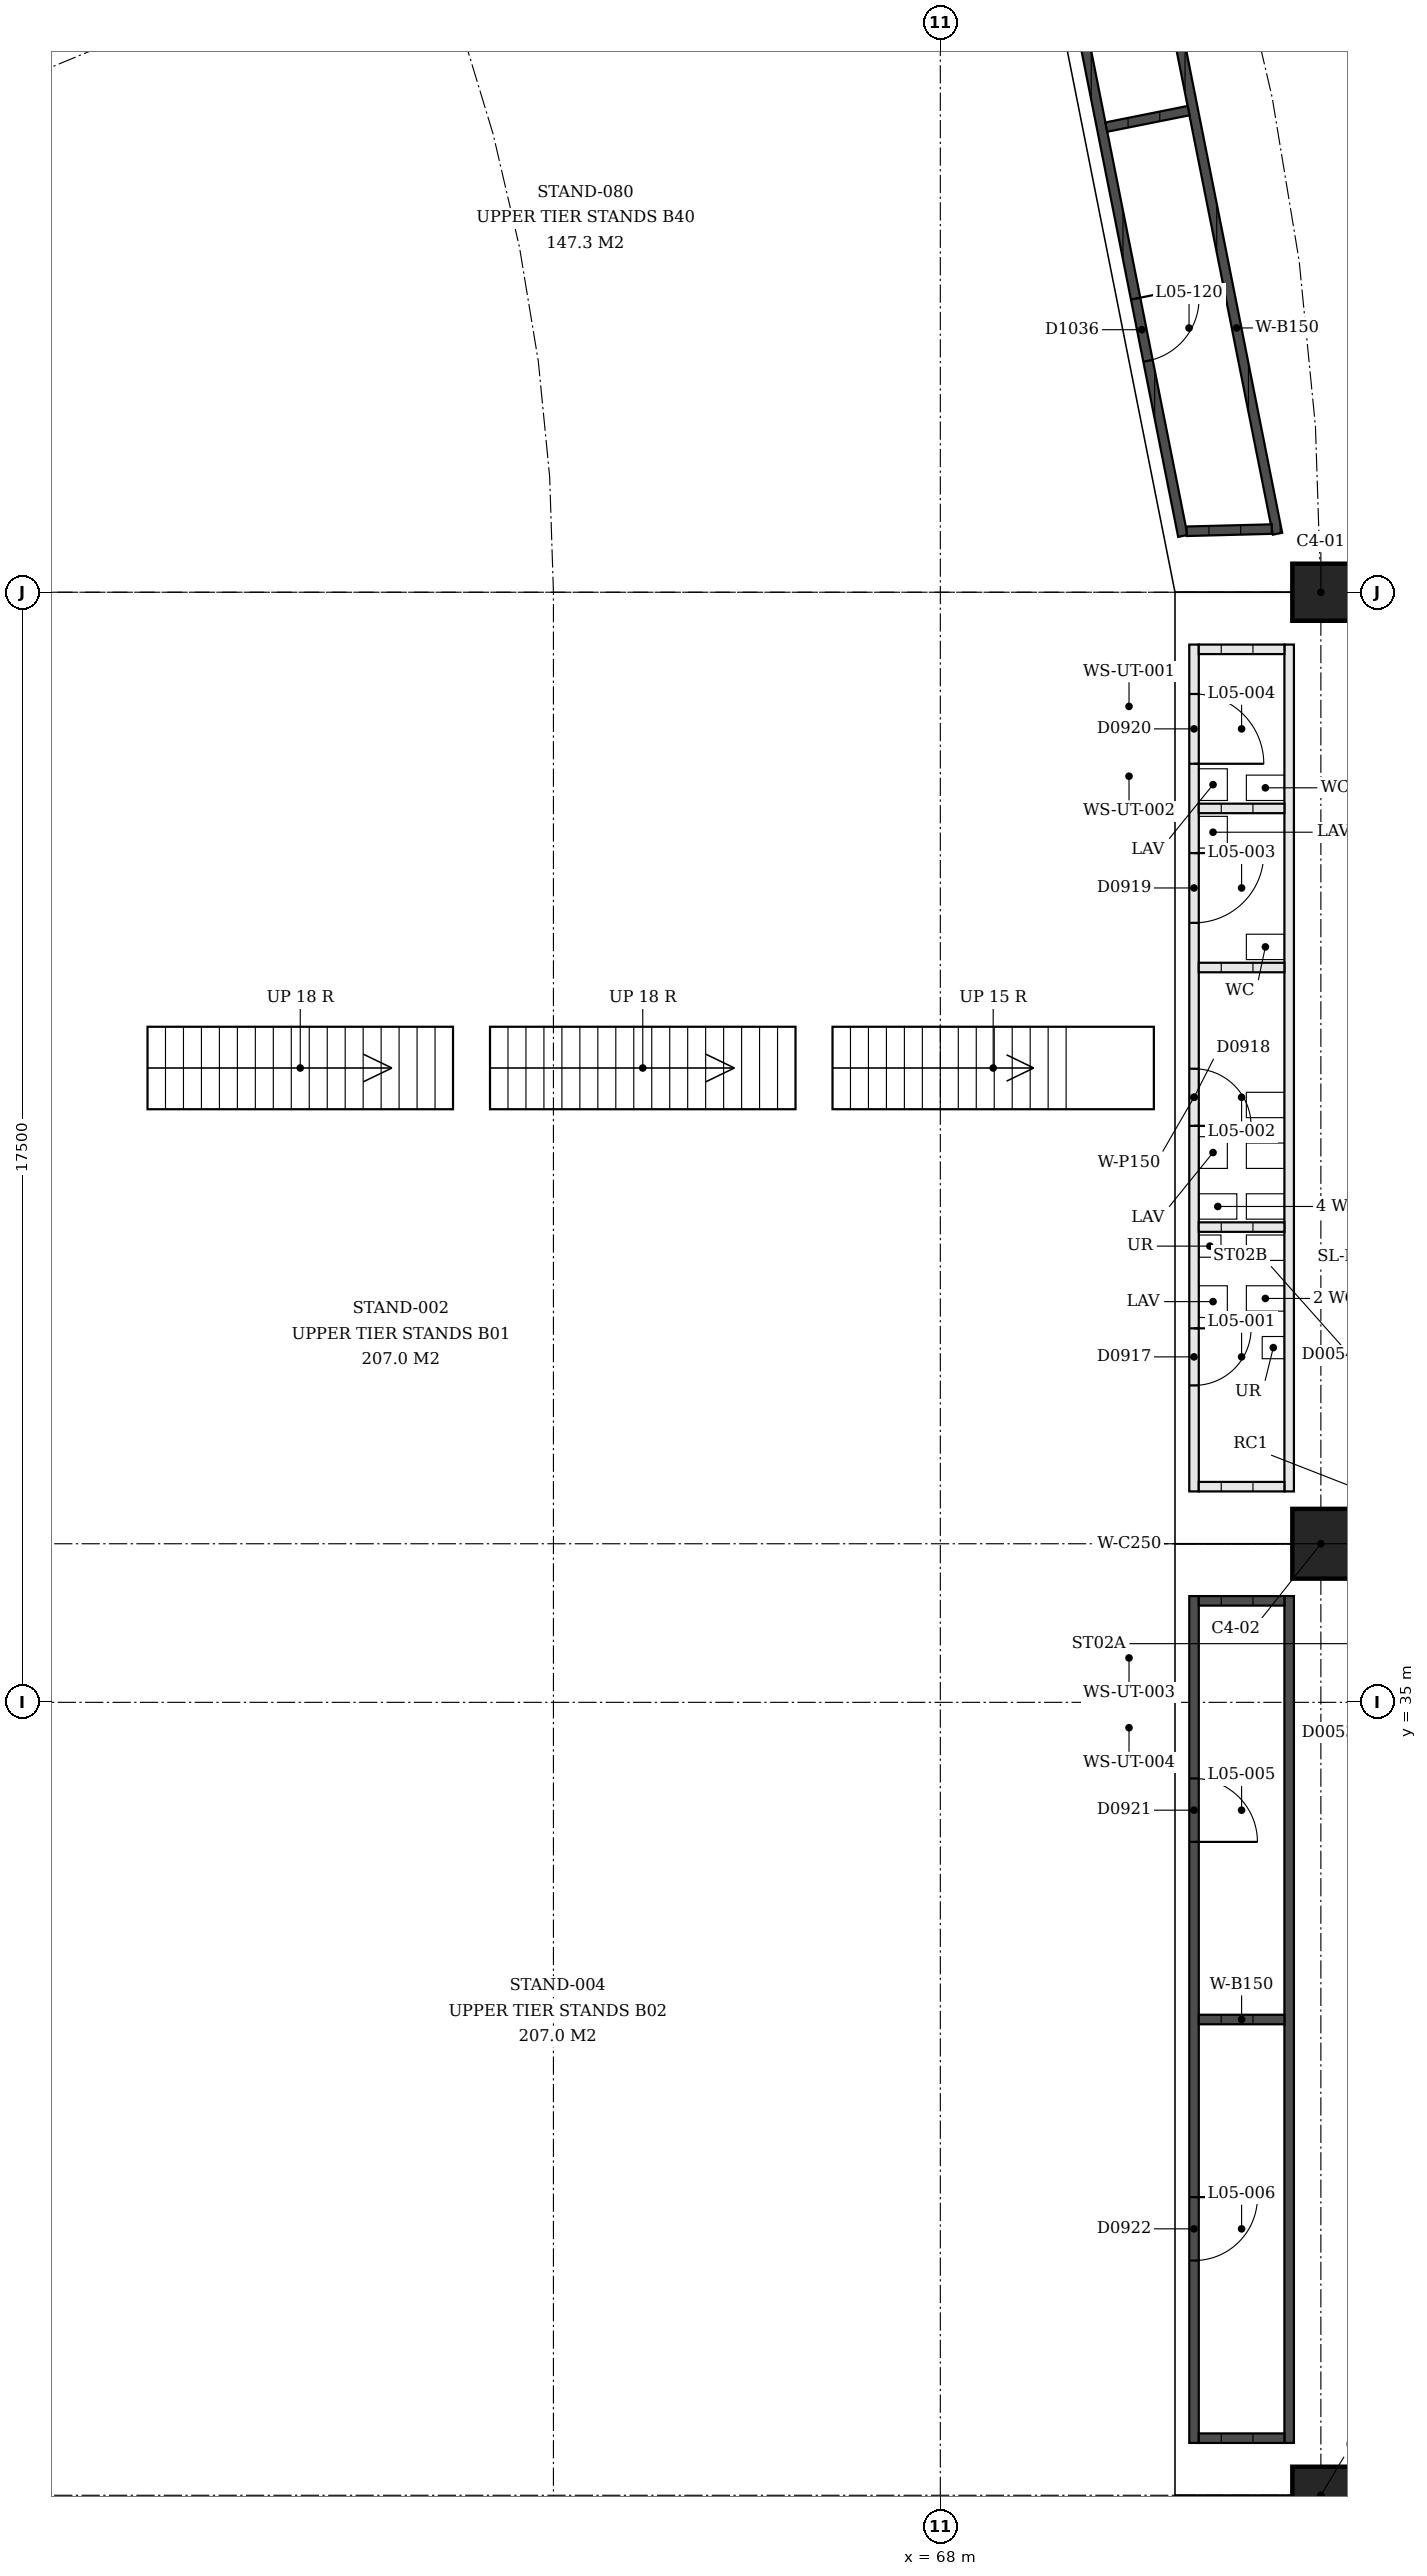
"""IFC4 building model, lengths in metres.
Left out: names, types, materials, properties, quantities, classifications, styles, units other than length and angle.
Written with IfcOpenShell. Run it as: python <this file> out.ifc"""

import sys

from ifc_helpers import new_model, si_unit, direction, frame, frame_2d, origin, origin_2d, place, context, subcontext, project, spatial, rectangle, extrude, element, fill, save


model = new_model("IFC4")
c1 = context("Model", 3, precision=1e-05, world=origin(), true_north=direction((0.0, 1.0)))
c2 = subcontext(c1, "Body", "Model", "MODEL_VIEW")
j1 = project(units=[si_unit("LENGTHUNIT", "METRE"), si_unit("PLANEANGLEUNIT", "RADIAN")], contexts=[c1])
p1 = place(None, origin())
s1 = spatial("IfcSite", under=j1, at=p1, CompositionType="ELEMENT")
p2 = place(p1, origin())
s2 = spatial("IfcBuilding", under=s1, at=p2, CompositionType="ELEMENT")
p3 = place(p2, frame((0.0, 0.0, 22.5)))
s3 = spatial("IfcBuildingStorey", under=s2, at=p3, CompositionType="ELEMENT", Elevation=22.5)
p4 = place(p3, frame((74.0, 52.5, 0.0), z_axis=(0.0, 0.0, 1.0), x_axis=(0.0, 1.0, 0.0)))
e1 = element("IfcColumn", 1, at=p4, inside=s3, PredefinedType="COLUMN", context=c2, shape_type="SweptSolid", body=[
    extrude(rectangle(XDim=0.9, YDim=0.9, at=origin_2d()), origin(), (0.0, 0.0, 1.0), 6.5),
])
p5 = place(p3, frame((74.0, 37.5, 0.0), z_axis=(0.0, 0.0, 1.0), x_axis=(0.0, 1.0, 0.0)))
e2 = element("IfcColumn", 2, at=p5, inside=s3, PredefinedType="COLUMN", context=c2, shape_type="SweptSolid", body=[
    extrude(rectangle(XDim=1.1, YDim=0.9, at=origin_2d()), origin(), (0.0, 0.0, 1.0), 6.5),
])
p6 = place(p3, frame((74.0, 22.5, 0.0), z_axis=(0.0, 0.0, 1.0), x_axis=(0.0, 1.0, 0.0)))
e3 = element("IfcColumn", 3, at=p6, inside=s3, PredefinedType="COLUMN", context=c2, shape_type="SweptSolid", body=[
    extrude(rectangle(XDim=0.9, YDim=0.9, at=origin_2d()), origin(), (0.0, 0.0, 1.0), 6.5),
])
p7 = place(p3, frame((72.0, 38.325, 0.0), z_axis=(0.0, 0.0, 1.0), x_axis=(0.0, 1.0, 0.0)))
e4 = element("IfcWall", 4, at=p7, inside=s3, PredefinedType="PARTITIONING", context=c2, shape_type="SweptSolid", body=[
    extrude(rectangle(XDim=13.35, YDim=0.15, at=frame_2d((6.675, 0.0))), origin(), (0.0, 0.0, 1.0), 3.0),
])
p8 = place(p7, frame((1.671, 0.0, 0.0)))
e5 = element("IfcOpeningElement", 5, at=p8, cuts=e4, PredefinedType="OPENING", context=c2, shape_type="SweptSolid", body=[
    extrude(rectangle(XDim=0.9, YDim=2.1, at=frame_2d((0.45, 1.05))), frame((0.0, 0.075, 0.0), z_axis=(0.0, -1.0, 0.0), x_axis=(1.0, 0.0, 0.0)), (0.0, 0.0, 1.0), 0.15),
])
p9 = place(p7, frame((5.763, 0.0, 0.0)))
e6 = element("IfcOpeningElement", 6, at=p9, cuts=e4, PredefinedType="OPENING", context=c2, shape_type="SweptSolid", body=[
    extrude(rectangle(XDim=0.9, YDim=2.1, at=frame_2d((0.45, 1.05))), frame((0.0, 0.075, 0.0), z_axis=(0.0, -1.0, 0.0), x_axis=(1.0, 0.0, 0.0)), (0.0, 0.0, 1.0), 0.15),
])
p10 = place(p7, frame((8.963, 0.0, 0.0)))
e7 = element("IfcOpeningElement", 7, at=p10, cuts=e4, PredefinedType="OPENING", context=c2, shape_type="SweptSolid", body=[
    extrude(rectangle(XDim=1.1, YDim=2.1, at=frame_2d((0.55, 1.05))), frame((0.0, 0.075, 0.0), z_axis=(0.0, -1.0, 0.0), x_axis=(1.0, 0.0, 0.0)), (0.0, 0.0, 1.0), 0.15),
])
p11 = place(p7, frame((11.471, 0.0, 0.0)))
e8 = element("IfcOpeningElement", 8, at=p11, cuts=e4, PredefinedType="OPENING", context=c2, shape_type="SweptSolid", body=[
    extrude(rectangle(XDim=1.1, YDim=2.1, at=frame_2d((0.55, 1.05))), frame((0.0, 0.075, 0.0), z_axis=(0.0, -1.0, 0.0), x_axis=(1.0, 0.0, 0.0)), (0.0, 0.0, 1.0), 0.15),
])
p12 = place(p3, frame((73.5, 38.325, 0.0), z_axis=(0.0, 0.0, 1.0), x_axis=(0.0, 1.0, 0.0)))
e9 = element("IfcWall", 9, at=p12, inside=s3, PredefinedType="PARTITIONING", context=c2, shape_type="SweptSolid", body=[
    extrude(rectangle(XDim=13.35, YDim=0.15, at=frame_2d((6.675, 0.0))), origin(), (0.0, 0.0, 1.0), 3.0),
])
for number, where, z_axis, x_axis in (
    (10, (72.075, 38.4, 0.0), (0.0, 0.0, 1.0), (1.0, 0.0, 0.0)),
    (11, (72.075, 42.492, 0.0), (0.0, 0.0, 1.0), (1.0, 0.0, 0.0)),
    (12, (72.075, 46.584, 0.0), (0.0, 0.0, 1.0), (1.0, 0.0, 0.0)),
    (13, (72.075, 49.092, 0.0), (0.0, 0.0, 1.0), (1.0, 0.0, 0.0)),
    (14, (72.075, 51.6, 0.0), (0.0, 0.0, 1.0), (1.0, 0.0, 0.0)),
):
    element("IfcWall", number, at=place(p3, frame(where, z_axis=z_axis, x_axis=x_axis)), inside=s3, PredefinedType="PARTITIONING", context=c2, shape_type="SweptSolid", body=[
        extrude(rectangle(XDim=1.35, YDim=0.15, at=frame_2d((0.675, 0.0))), origin(), (0.0, 0.0, 1.0), 3.0),
    ])
p13 = place(p3, frame((72.0, 36.675, 0.0), z_axis=(0.0, 0.0, 1.0), x_axis=(0.0, -1.0, 0.0)))
e15 = element("IfcWall", 15, at=p13, inside=s3, PredefinedType="SOLIDWALL", context=c2, shape_type="SweptSolid", body=[
    extrude(rectangle(XDim=13.35, YDim=0.15, at=frame_2d((6.675, 0.0))), origin(), (0.0, 0.0, 1.0), 3.0),
])
p14 = place(p13, frame((2.875, 0.0, 0.0)))
e16 = element("IfcOpeningElement", 16, at=p14, cuts=e15, PredefinedType="OPENING", context=c2, shape_type="SweptSolid", body=[
    extrude(rectangle(XDim=1.0, YDim=2.1, at=frame_2d((0.5, 1.05))), frame((0.0, 0.075, 0.0), z_axis=(0.0, -1.0, 0.0), x_axis=(1.0, 0.0, 0.0)), (0.0, 0.0, 1.0), 0.15),
])
p15 = place(p13, frame((9.475, 0.0, 0.0)))
e17 = element("IfcOpeningElement", 17, at=p15, cuts=e15, PredefinedType="OPENING", context=c2, shape_type="SweptSolid", body=[
    extrude(rectangle(XDim=1.0, YDim=2.1, at=frame_2d((0.5, 1.05))), frame((0.0, 0.075, 0.0), z_axis=(0.0, -1.0, 0.0), x_axis=(1.0, 0.0, 0.0)), (0.0, 0.0, 1.0), 0.15),
])
p16 = place(p3, frame((73.5, 36.675, 0.0), z_axis=(0.0, 0.0, 1.0), x_axis=(0.0, -1.0, 0.0)))
e18 = element("IfcWall", 18, at=p16, inside=s3, PredefinedType="SOLIDWALL", context=c2, shape_type="SweptSolid", body=[
    extrude(rectangle(XDim=13.35, YDim=0.15, at=frame_2d((6.675, 0.0))), origin(), (0.0, 0.0, 1.0), 3.0),
])
for number, where, z_axis, x_axis in (
    (19, (72.075, 36.6, 0.0), (0.0, 0.0, 1.0), (1.0, 0.0, 0.0)),
    (20, (72.075, 30.0, 0.0), (0.0, 0.0, 1.0), (1.0, 0.0, 0.0)),
    (21, (72.075, 23.4, 0.0), (0.0, 0.0, 1.0), (1.0, 0.0, 0.0)),
):
    element("IfcWall", number, at=place(p3, frame(where, z_axis=z_axis, x_axis=x_axis)), inside=s3, PredefinedType="SOLIDWALL", context=c2, shape_type="SweptSolid", body=[
        extrude(rectangle(XDim=1.35, YDim=0.15, at=frame_2d((0.675, 0.0))), origin(), (0.0, 0.0, 1.0), 3.0),
    ])
p17 = place(p3, frame((69.265, 66.249, 0.0), z_axis=(0.0, 0.0, 1.0), x_axis=(0.195095631841, -0.980784224198, 0.0)))
e22 = element("IfcWall", 22, at=p17, inside=s3, PredefinedType="SOLIDWALL", context=c2, shape_type="SweptSolid", body=[
    extrude(rectangle(XDim=13.113, YDim=0.15, at=frame_2d((6.557, 0.0))), origin(), (0.0, 0.0, 1.0), 3.0),
])
p18 = place(p17, frame((2.815, 0.0, 0.0)))
e23 = element("IfcOpeningElement", 23, at=p18, cuts=e22, PredefinedType="OPENING", context=c2, shape_type="SweptSolid", body=[
    extrude(rectangle(XDim=1.0, YDim=2.1, at=frame_2d((0.5, 1.05))), frame((0.0, 0.075, 0.0), z_axis=(0.0, -1.0, 0.0), x_axis=(1.0, 0.0, 0.0)), (0.0, 0.0, 1.0), 0.15),
])
p19 = place(p17, frame((9.298, 0.0, 0.0)))
e24 = element("IfcOpeningElement", 24, at=p19, cuts=e22, PredefinedType="OPENING", context=c2, shape_type="SweptSolid", body=[
    extrude(rectangle(XDim=1.0, YDim=2.1, at=frame_2d((0.5, 1.05))), frame((0.0, 0.075, 0.0), z_axis=(0.0, -1.0, 0.0), x_axis=(1.0, 0.0, 0.0)), (0.0, 0.0, 1.0), 0.15),
])
p20 = place(p3, frame((70.657, 66.791, 0.0), z_axis=(0.0, 0.0, 1.0), x_axis=(0.195103376128, -0.980782683689, 0.0)))
e25 = element("IfcWall", 25, at=p20, inside=s3, PredefinedType="SOLIDWALL", context=c2, shape_type="SweptSolid", body=[
    extrude(rectangle(XDim=13.631, YDim=0.15, at=frame_2d((6.815, 0.0))), origin(), (0.0, 0.0, 1.0), 3.0),
])
p21 = place(p3, frame((70.616, 59.832, 0.0), z_axis=(0.0, 0.0, 1.0), x_axis=(0.980531003602, 0.196364332237, 0.0)))
e26 = element("IfcWall", 26, at=p21, inside=s3, PredefinedType="SOLIDWALL", context=c2, shape_type="SweptSolid", body=[
    extrude(rectangle(XDim=1.324, YDim=0.15, at=frame_2d((0.662, 0.0))), origin(), (0.0, 0.0, 1.0), 3.0),
])
p22 = place(p3, frame((71.884, 53.461, 0.0), z_axis=(0.0, 0.0, 1.0), x_axis=(0.999681029438, 0.025255482205, 0.0)))
e27 = element("IfcWall", 27, at=p22, inside=s3, PredefinedType="SOLIDWALL", context=c2, shape_type="SweptSolid", body=[
    extrude(rectangle(XDim=1.344, YDim=0.15, at=frame_2d((0.672, 0.0))), origin(), (0.0, 0.0, 1.0), 3.0),
])
p23 = place(p8, origin())
e28 = element("IfcDoor", 28, at=p23, inside=s3, OperationType="SINGLE_SWING_RIGHT", PredefinedType="DOOR", context=c2, shape_type="SweptSolid", body=[
    extrude(rectangle(XDim=0.9, YDim=2.1, at=frame_2d((0.45, 1.05))), frame((0.0, 0.025, 0.0), z_axis=(0.0, -1.0, 0.0), x_axis=(1.0, 0.0, 0.0)), (0.0, 0.0, 1.0), 0.05),
])
fill(e5, e28)
p24 = place(p9, origin())
e29 = element("IfcDoor", 29, at=p24, inside=s3, OperationType="SINGLE_SWING_LEFT", PredefinedType="DOOR", context=c2, shape_type="SweptSolid", body=[
    extrude(rectangle(XDim=0.9, YDim=2.1, at=frame_2d((0.45, 1.05))), frame((0.0, 0.025, 0.0), z_axis=(0.0, -1.0, 0.0), x_axis=(1.0, 0.0, 0.0)), (0.0, 0.0, 1.0), 0.05),
])
fill(e6, e29)
p25 = place(p10, origin())
e30 = element("IfcDoor", 30, at=p25, inside=s3, OperationType="SINGLE_SWING_RIGHT", PredefinedType="DOOR", context=c2, shape_type="SweptSolid", body=[
    extrude(rectangle(XDim=1.1, YDim=2.1, at=frame_2d((0.55, 1.05))), frame((0.0, 0.025, 0.0), z_axis=(0.0, -1.0, 0.0), x_axis=(1.0, 0.0, 0.0)), (0.0, 0.0, 1.0), 0.05),
])
fill(e7, e30)
p26 = place(p11, origin())
e31 = element("IfcDoor", 31, at=p26, inside=s3, OperationType="SINGLE_SWING_LEFT", PredefinedType="DOOR", context=c2, shape_type="SweptSolid", body=[
    extrude(rectangle(XDim=1.1, YDim=2.1, at=frame_2d((0.55, 1.05))), frame((0.0, 0.025, 0.0), z_axis=(0.0, -1.0, 0.0), x_axis=(1.0, 0.0, 0.0)), (0.0, 0.0, 1.0), 0.05),
])
fill(e8, e31)
p27 = place(p14, origin())
e32 = element("IfcDoor", 32, at=p27, inside=s3, OperationType="SINGLE_SWING_LEFT", PredefinedType="DOOR", context=c2, shape_type="SweptSolid", body=[
    extrude(rectangle(XDim=1.0, YDim=2.1, at=frame_2d((0.5, 1.05))), frame((0.0, 0.025, 0.0), z_axis=(0.0, -1.0, 0.0), x_axis=(1.0, 0.0, 0.0)), (0.0, 0.0, 1.0), 0.05),
])
fill(e16, e32)
p28 = place(p15, origin())
e33 = element("IfcDoor", 33, at=p28, inside=s3, OperationType="SINGLE_SWING_RIGHT", PredefinedType="DOOR", context=c2, shape_type="SweptSolid", body=[
    extrude(rectangle(XDim=1.0, YDim=2.1, at=frame_2d((0.5, 1.05))), frame((0.0, 0.025, 0.0), z_axis=(0.0, -1.0, 0.0), x_axis=(1.0, 0.0, 0.0)), (0.0, 0.0, 1.0), 0.05),
])
fill(e17, e33)
p29 = place(p19, origin())
e34 = element("IfcDoor", 34, at=p29, inside=s3, OperationType="SINGLE_SWING_RIGHT", PredefinedType="DOOR", context=c2, shape_type="SweptSolid", body=[
    extrude(rectangle(XDim=1.0, YDim=2.1, at=frame_2d((0.5, 1.05))), frame((0.0, 0.025, 0.0), z_axis=(0.0, -1.0, 0.0), x_axis=(1.0, 0.0, 0.0)), (0.0, 0.0, 1.0), 0.05),
])
fill(e24, e34)
save(model, sys.argv[1])
